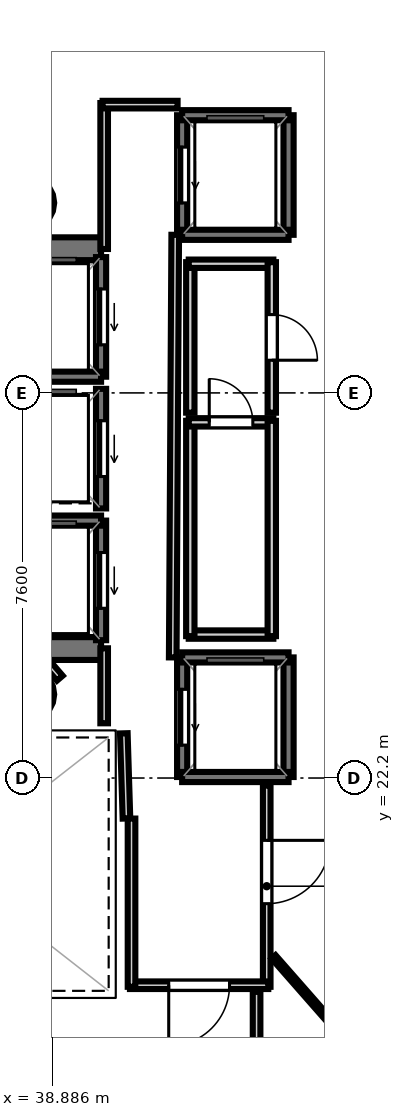
"""IFC4 building model, lengths in metres.
Left out: names, types, materials, properties, quantities, classifications, styles, units other than length and angle.
Written with IfcOpenShell. Run it as: python <this file> out.ifc"""

import sys

from ifc_helpers import new_model, si_unit, direction, frame, frame_2d, origin, origin_2d, place, context, subcontext, project, spatial, rectangle, hollow_circle, extrude, element, fill, save


model = new_model("IFC4")
c1 = context("Model", 3, precision=1e-05, world=origin(), true_north=direction((0.0, 1.0)))
c2 = subcontext(c1, "Body", "Model", "MODEL_VIEW")
j1 = project(units=[si_unit("LENGTHUNIT", "METRE"), si_unit("PLANEANGLEUNIT", "RADIAN")], contexts=[c1])
p1 = place(None, origin())
s1 = spatial("IfcSite", under=j1, at=p1, CompositionType="ELEMENT")
p2 = place(p1, origin())
s2 = spatial("IfcBuilding", under=s1, at=p2, CompositionType="ELEMENT")
p3 = place(p2, frame((0.0, 0.0, 261.2)))
s3 = spatial("IfcBuildingStorey", under=s2, at=p3, CompositionType="ELEMENT", Elevation=261.2)
p4 = place(p3, frame((29.33, 32.645, 0.0), z_axis=(0.0, 0.0, 1.0), x_axis=(1.0, 0.0, 0.0)))
e1 = element("IfcWall", 1, at=p4, inside=s3, PredefinedType="SHEAR", context=c2, shape_type="SweptSolid", body=[
    extrude(rectangle(XDim=10.52, YDim=0.45, at=frame_2d((5.26, 0.0))), origin(), (0.0, 0.0, 1.0), 3.52),
])
p5 = place(p4, frame((0.895, 0.0, 0.0)))
e2 = element("IfcOpeningElement", 2, at=p5, cuts=e1, PredefinedType="OPENING", context=c2, shape_type="SweptSolid", body=[
    extrude(rectangle(XDim=1.25, YDim=2.15, at=frame_2d((0.625, 1.075))), frame((0.0, 0.235, 0.0), z_axis=(0.0, -1.0, 0.0), x_axis=(1.0, 0.0, 0.0)), (0.0, 0.0, 1.0), 0.47),
])
p6 = place(p3, frame((29.33, 24.755, 0.0), z_axis=(0.0, 0.0, 1.0), x_axis=(1.0, 0.0, 0.0)))
e3 = element("IfcWall", 3, at=p6, inside=s3, PredefinedType="SHEAR", context=c2, shape_type="SweptSolid", body=[
    extrude(rectangle(XDim=10.52, YDim=0.45, at=frame_2d((5.26, 0.0))), origin(), (0.0, 0.0, 1.0), 3.52),
])
p7 = place(p6, frame((0.695, 0.0, 0.0)))
e4 = element("IfcOpeningElement", 4, at=p7, cuts=e3, PredefinedType="OPENING", context=c2, shape_type="SweptSolid", body=[
    extrude(rectangle(XDim=1.25, YDim=2.15, at=frame_2d((0.625, 1.075))), frame((0.0, 0.235, 0.0), z_axis=(0.0, -1.0, 0.0), x_axis=(1.0, 0.0, 0.0)), (0.0, 0.0, 1.0), 0.47),
])
for number, where, z_axis, x_axis in (
    (5, (38.4, 33.55, 0.0), (0.0, 0.0, 1.0), (1.0, 0.0, 0.0)),
    (6, (38.4, 23.85, 0.0), (0.0, 0.0, 1.0), (1.0, 0.0, 0.0)),
):
    element("IfcColumn", number, at=place(p3, frame(where, z_axis=z_axis, x_axis=x_axis)), inside=s3, PredefinedType="COLUMN", context=c2, shape_type="SweptSolid", body=[
        extrude(hollow_circle(Radius=0.525, WallThickness=0.028, at=origin_2d()), origin(), (0.0, 0.0, 1.0), 3.7),
    ])
p8 = place(p3, frame((39.85, 30.12, 0.0), z_axis=(0.0, 0.0, 1.0), x_axis=(0.0, 1.0, 0.0)))
e7 = element("IfcWall", 7, at=p8, inside=s3, PredefinedType="SOLIDWALL", context=c2, shape_type="SweptSolid", body=[
    extrude(rectangle(XDim=2.36, YDim=0.2, at=frame_2d((1.18, 0.0))), origin(), (0.0, 0.0, 1.0), 3.52),
])
p9 = place(p8, frame((0.63, 0.0, 0.0)))
e8 = element("IfcOpeningElement", 8, at=p9, cuts=e7, PredefinedType="OPENING", context=c2, shape_type="SweptSolid", body=[
    extrude(rectangle(XDim=1.1, YDim=2.15, at=frame_2d((0.55, 1.075))), frame((0.0, 0.11, 0.0), z_axis=(0.0, -1.0, 0.0), x_axis=(1.0, 0.0, 0.0)), (0.0, 0.0, 1.0), 0.22),
])
p10 = place(p3, frame((37.75, 30.12, 0.0), z_axis=(0.0, 0.0, 1.0), x_axis=(1.0, 0.0, 0.0)))
e9 = element("IfcWall", 9, at=p10, inside=s3, PredefinedType="SOLIDWALL", context=c2, shape_type="SweptSolid", body=[
    extrude(rectangle(XDim=2.1, YDim=0.2, at=frame_2d((1.05, 0.0))), origin(), (0.0, 0.0, 1.0), 3.52),
])
p11 = place(p3, frame((39.85, 24.92, 0.0), z_axis=(0.0, 0.0, 1.0), x_axis=(0.0, 1.0, 0.0)))
e10 = element("IfcWall", 10, at=p11, inside=s3, PredefinedType="SOLIDWALL", context=c2, shape_type="SweptSolid", body=[
    extrude(rectangle(XDim=2.36, YDim=0.2, at=frame_2d((1.18, 0.0))), origin(), (0.0, 0.0, 1.0), 3.52),
])
p12 = place(p11, frame((0.63, 0.0, 0.0)))
e11 = element("IfcOpeningElement", 11, at=p12, cuts=e10, PredefinedType="OPENING", context=c2, shape_type="SweptSolid", body=[
    extrude(rectangle(XDim=1.1, YDim=2.15, at=frame_2d((0.55, 1.075))), frame((0.0, 0.11, 0.0), z_axis=(0.0, -1.0, 0.0), x_axis=(1.0, 0.0, 0.0)), (0.0, 0.0, 1.0), 0.22),
])
p13 = place(p3, frame((37.75, 27.28, 0.0), z_axis=(0.0, 0.0, 1.0), x_axis=(1.0, 0.0, 0.0)))
e12 = element("IfcWall", 12, at=p13, inside=s3, PredefinedType="SOLIDWALL", context=c2, shape_type="SweptSolid", body=[
    extrude(rectangle(XDim=2.1, YDim=0.2, at=frame_2d((1.05, 0.0))), origin(), (0.0, 0.0, 1.0), 3.52),
])
p14 = place(p3, frame((39.85, 27.52, 0.0), z_axis=(0.0, 0.0, 1.0), x_axis=(0.0, 1.0, 0.0)))
e13 = element("IfcWall", 13, at=p14, inside=s3, PredefinedType="SOLIDWALL", context=c2, shape_type="SweptSolid", body=[
    extrude(rectangle(XDim=2.36, YDim=0.2, at=frame_2d((1.18, 0.0))), origin(), (0.0, 0.0, 1.0), 3.52),
])
p15 = place(p14, frame((0.63, 0.0, 0.0)))
e14 = element("IfcOpeningElement", 14, at=p15, cuts=e13, PredefinedType="OPENING", context=c2, shape_type="SweptSolid", body=[
    extrude(rectangle(XDim=1.1, YDim=2.15, at=frame_2d((0.55, 1.075))), frame((0.0, 0.11, 0.0), z_axis=(0.0, -1.0, 0.0), x_axis=(1.0, 0.0, 0.0)), (0.0, 0.0, 1.0), 0.22),
])
p16 = place(p3, frame((43.55, 22.22, 0.0), z_axis=(0.0, 0.0, 1.0), x_axis=(0.0, 1.0, 0.0)))
e15 = element("IfcWall", 15, at=p16, inside=s3, PredefinedType="SOLIDWALL", context=c2, shape_type="SweptSolid", body=[
    extrude(rectangle(XDim=2.36, YDim=0.2, at=frame_2d((1.18, 0.0))), origin(), (0.0, 0.0, 1.0), 3.52),
])
p17 = place(p3, frame((41.45, 22.22, 0.0), z_axis=(0.0, 0.0, 1.0), x_axis=(0.0, 1.0, 0.0)))
e16 = element("IfcWall", 16, at=p17, inside=s3, PredefinedType="SOLIDWALL", context=c2, shape_type="SweptSolid", body=[
    extrude(rectangle(XDim=2.36, YDim=0.2, at=frame_2d((1.18, 0.0))), origin(), (0.0, 0.0, 1.0), 3.52),
])
p18 = place(p17, frame((0.63, 0.0, 0.0)))
e17 = element("IfcOpeningElement", 17, at=p18, cuts=e16, PredefinedType="OPENING", context=c2, shape_type="SweptSolid", body=[
    extrude(rectangle(XDim=1.1, YDim=2.15, at=frame_2d((0.55, 1.075))), frame((0.0, 0.11, 0.0), z_axis=(0.0, -1.0, 0.0), x_axis=(1.0, 0.0, 0.0)), (0.0, 0.0, 1.0), 0.22),
])
for number, where, z_axis, x_axis in (
    (18, (41.45, 24.58, 0.0), (0.0, 0.0, 1.0), (1.0, 0.0, 0.0)),
    (19, (41.45, 22.22, 0.0), (0.0, 0.0, 1.0), (1.0, 0.0, 0.0)),
):
    element("IfcWall", number, at=place(p3, frame(where, z_axis=z_axis, x_axis=x_axis)), inside=s3, PredefinedType="SOLIDWALL", context=c2, shape_type="SweptSolid", body=[
        extrude(rectangle(XDim=2.1, YDim=0.2, at=frame_2d((1.05, 0.0))), origin(), (0.0, 0.0, 1.0), 3.52),
    ])
p19 = place(p3, frame((43.55, 32.92, 0.0), z_axis=(0.0, 0.0, 1.0), x_axis=(0.0, 1.0, 0.0)))
e20 = element("IfcWall", 20, at=p19, inside=s3, PredefinedType="SOLIDWALL", context=c2, shape_type="SweptSolid", body=[
    extrude(rectangle(XDim=2.36, YDim=0.2, at=frame_2d((1.18, 0.0))), origin(), (0.0, 0.0, 1.0), 3.52),
])
p20 = place(p3, frame((41.45, 32.92, 0.0), z_axis=(0.0, 0.0, 1.0), x_axis=(0.0, 1.0, 0.0)))
e21 = element("IfcWall", 21, at=p20, inside=s3, PredefinedType="SOLIDWALL", context=c2, shape_type="SweptSolid", body=[
    extrude(rectangle(XDim=2.36, YDim=0.2, at=frame_2d((1.18, 0.0))), origin(), (0.0, 0.0, 1.0), 3.52),
])
p21 = place(p20, frame((0.63, 0.0, 0.0)))
e22 = element("IfcOpeningElement", 22, at=p21, cuts=e21, PredefinedType="OPENING", context=c2, shape_type="SweptSolid", body=[
    extrude(rectangle(XDim=1.1, YDim=2.15, at=frame_2d((0.55, 1.075))), frame((0.0, 0.11, 0.0), z_axis=(0.0, -1.0, 0.0), x_axis=(1.0, 0.0, 0.0)), (0.0, 0.0, 1.0), 0.22),
])
for number, where, z_axis, x_axis in (
    (23, (41.45, 35.28, 0.0), (0.0, 0.0, 1.0), (1.0, 0.0, 0.0)),
    (24, (41.45, 32.92, 0.0), (0.0, 0.0, 1.0), (1.0, 0.0, 0.0)),
):
    element("IfcWall", number, at=place(p3, frame(where, z_axis=z_axis, x_axis=x_axis)), inside=s3, PredefinedType="SOLIDWALL", context=c2, shape_type="SweptSolid", body=[
        extrude(rectangle(XDim=2.1, YDim=0.2, at=frame_2d((1.05, 0.0))), origin(), (0.0, 0.0, 1.0), 3.52),
    ])
p22 = place(p3, frame((40.351, 21.401, 0.0), z_axis=(0.0, 0.0, 1.0), x_axis=(-0.031058045979, 0.999517582527, 0.0)))
e25 = element("IfcWall", 25, at=p22, inside=s3, PredefinedType="PARTITIONING", context=c2, shape_type="SweptSolid", body=[
    extrude(rectangle(XDim=1.682, YDim=0.15, at=frame_2d((0.841, 0.0))), origin(), (0.0, 0.0, 1.0), 2.84),
])
p23 = place(p3, frame((39.911, 23.28, 0.0), z_axis=(0.0, 0.0, 1.0), x_axis=(0.0, 1.0, 0.0)))
e26 = element("IfcWall", 26, at=p23, inside=s3, PredefinedType="PARTITIONING", context=c2, shape_type="SweptSolid", body=[
    extrude(rectangle(XDim=1.48, YDim=0.15, at=frame_2d((0.74, 0.0))), origin(), (0.0, 0.0, 1.0), 2.84),
])
p24 = place(p3, frame((39.911, 32.64, 0.0), z_axis=(0.0, 0.0, 1.0), x_axis=(0.0, 1.0, 0.0)))
e27 = element("IfcWall", 27, at=p24, inside=s3, PredefinedType="PARTITIONING", context=c2, shape_type="SweptSolid", body=[
    extrude(rectangle(XDim=2.88, YDim=0.15, at=frame_2d((1.44, 0.0))), origin(), (0.0, 0.0, 1.0), 2.84),
])
p25 = place(p3, frame((39.88, 35.489, 0.0), z_axis=(0.0, 0.0, 1.0), x_axis=(1.0, 0.0, 0.0)))
e28 = element("IfcWall", 28, at=p25, inside=s3, PredefinedType="PARTITIONING", context=c2, shape_type="SweptSolid", body=[
    extrude(rectangle(XDim=1.48, YDim=0.15, at=frame_2d((0.74, 0.0))), origin(), (0.0, 0.0, 1.0), 2.84),
])
p26 = place(p3, frame((41.313, 32.92, 0.0), z_axis=(0.0, 0.0, 1.0), x_axis=(-0.005942518022, -0.999982343084, 0.0)))
e29 = element("IfcWall", 29, at=p26, inside=s3, PredefinedType="PARTITIONING", context=c2, shape_type="SweptSolid", body=[
    extrude(rectangle(XDim=8.34, YDim=0.15, at=frame_2d((4.17, 0.0))), origin(), (0.0, 0.0, 1.0), 2.84),
])
p27 = place(p3, frame((43.119, 22.05, 0.0), z_axis=(0.0, 0.0, 1.0), x_axis=(0.0, -1.0, 0.0)))
e30 = element("IfcWall", 30, at=p27, inside=s3, PredefinedType="PARTITIONING", context=c2, shape_type="SweptSolid", body=[
    extrude(rectangle(XDim=3.97, YDim=0.15, at=frame_2d((1.985, 0.0))), origin(), (0.0, 0.0, 1.0), 2.84),
])
p28 = place(p27, frame((1.08, 0.0, 0.0)))
e31 = element("IfcOpeningElement", 31, at=p28, cuts=e30, PredefinedType="OPENING", context=c2, shape_type="SweptSolid", body=[
    extrude(rectangle(XDim=1.25, YDim=2.2, at=frame_2d((0.625, 1.1))), frame((0.0, 0.085, 0.0), z_axis=(0.0, -1.0, 0.0), x_axis=(1.0, 0.0, 0.0)), (0.0, 0.0, 1.0), 0.17),
])
p29 = place(p3, frame((43.15, 18.111, 0.0), z_axis=(0.0, 0.0, 1.0), x_axis=(-1.0, 0.0, 0.0)))
e32 = element("IfcWall", 32, at=p29, inside=s3, PredefinedType="PARTITIONING", context=c2, shape_type="SweptSolid", body=[
    extrude(rectangle(XDim=2.73, YDim=0.15, at=frame_2d((1.365, 0.0))), origin(), (0.0, 0.0, 1.0), 2.84),
])
p30 = place(p29, frame((0.765, 0.0, 0.0)))
e33 = element("IfcOpeningElement", 33, at=p30, cuts=e32, PredefinedType="OPENING", context=c2, shape_type="SweptSolid", body=[
    extrude(rectangle(XDim=1.2, YDim=2.15, at=frame_2d((0.6, 1.075))), frame((0.0, 0.085, 0.0), z_axis=(0.0, -1.0, 0.0), x_axis=(1.0, 0.0, 0.0)), (0.0, 0.0, 1.0), 0.17),
])
p31 = place(p3, frame((40.451, 18.08, 0.0), z_axis=(0.0, 0.0, 1.0), x_axis=(0.0, 1.0, 0.0)))
e34 = element("IfcWall", 34, at=p31, inside=s3, PredefinedType="PARTITIONING", context=c2, shape_type="SweptSolid", body=[
    extrude(rectangle(XDim=3.32, YDim=0.15, at=frame_2d((1.66, 0.0))), origin(), (0.0, 0.0, 1.0), 2.84),
])
p32 = place(p3, frame((43.25, 25.031, 0.0), z_axis=(0.0, 0.0, 1.0), x_axis=(-1.0, 0.0, 0.0)))
e35 = element("IfcWall", 35, at=p32, inside=s3, PredefinedType="PLUMBINGWALL", context=c2, shape_type="SweptSolid", body=[
    extrude(rectangle(XDim=1.67, YDim=0.165, at=frame_2d((0.835, 0.0))), origin(), (0.0, 0.0, 1.0), 2.84),
])
p33 = place(p3, frame((41.611, 25.0, 0.0), z_axis=(0.0, 0.0, 1.0), x_axis=(0.0, 1.0, 0.0)))
e36 = element("IfcWall", 36, at=p33, inside=s3, PredefinedType="PLUMBINGWALL", context=c2, shape_type="SweptSolid", body=[
    extrude(rectangle(XDim=4.25, YDim=0.165, at=frame_2d((2.125, 0.0))), origin(), (0.0, 0.0, 1.0), 2.84),
])
p34 = place(p3, frame((41.58, 29.219, 0.0), z_axis=(0.0, 0.0, 1.0), x_axis=(1.0, 0.0, 0.0)))
e37 = element("IfcWall", 37, at=p34, inside=s3, PredefinedType="PLUMBINGWALL", context=c2, shape_type="SweptSolid", body=[
    extrude(rectangle(XDim=1.67, YDim=0.165, at=frame_2d((0.835, 0.0))), origin(), (0.0, 0.0, 1.0), 2.84),
])
p35 = place(p34, frame((0.405, 0.0, 0.0)))
e38 = element("IfcOpeningElement", 38, at=p35, cuts=e37, PredefinedType="OPENING", context=c2, shape_type="SweptSolid", body=[
    extrude(rectangle(XDim=0.86, YDim=2.05, at=frame_2d((0.43, 1.025))), frame((0.0, 0.093, 0.0), z_axis=(0.0, -1.0, 0.0), x_axis=(1.0, 0.0, 0.0)), (0.0, 0.0, 1.0), 0.185),
])
p36 = place(p3, frame((43.219, 29.25, 0.0), z_axis=(0.0, 0.0, 1.0), x_axis=(0.0, -1.0, 0.0)))
e39 = element("IfcWall", 39, at=p36, inside=s3, PredefinedType="PLUMBINGWALL", context=c2, shape_type="SweptSolid", body=[
    extrude(rectangle(XDim=4.25, YDim=0.165, at=frame_2d((2.125, 0.0))), origin(), (0.0, 0.0, 1.0), 2.84),
])
p37 = place(p3, frame((41.611, 29.41, 0.0), z_axis=(0.0, 0.0, 1.0), x_axis=(0.0, 1.0, 0.0)))
e40 = element("IfcWall", 40, at=p37, inside=s3, PredefinedType="PLUMBINGWALL", context=c2, shape_type="SweptSolid", body=[
    extrude(rectangle(XDim=2.97, YDim=0.165, at=frame_2d((1.485, 0.0))), origin(), (0.0, 0.0, 1.0), 2.84),
])
p38 = place(p3, frame((41.58, 32.349, 0.0), z_axis=(0.0, 0.0, 1.0), x_axis=(1.0, 0.0, 0.0)))
e41 = element("IfcWall", 41, at=p38, inside=s3, PredefinedType="PLUMBINGWALL", context=c2, shape_type="SweptSolid", body=[
    extrude(rectangle(XDim=1.67, YDim=0.165, at=frame_2d((0.835, 0.0))), origin(), (0.0, 0.0, 1.0), 2.84),
])
p39 = place(p3, frame((43.219, 32.38, 0.0), z_axis=(0.0, 0.0, 1.0), x_axis=(0.0, -1.0, 0.0)))
e42 = element("IfcWall", 42, at=p39, inside=s3, PredefinedType="PLUMBINGWALL", context=c2, shape_type="SweptSolid", body=[
    extrude(rectangle(XDim=2.97, YDim=0.165, at=frame_2d((1.485, 0.0))), origin(), (0.0, 0.0, 1.0), 2.84),
])
p40 = place(p39, frame((1.035, 0.0, 0.0)))
e43 = element("IfcOpeningElement", 43, at=p40, cuts=e42, PredefinedType="OPENING", context=c2, shape_type="SweptSolid", body=[
    extrude(rectangle(XDim=0.9, YDim=2.1, at=frame_2d((0.45, 1.05))), frame((0.0, 0.093, 0.0), z_axis=(0.0, -1.0, 0.0), x_axis=(1.0, 0.0, 0.0)), (0.0, 0.0, 1.0), 0.185),
])
p41 = place(p3, frame((39.036, 24.17, 0.0), z_axis=(0.0, 0.0, 1.0), x_axis=(-0.652260263346, 0.757995084984, 0.0)))
e44 = element("IfcWall", 44, at=p41, inside=s3, PredefinedType="PARTITIONING", context=c2, shape_type="SweptSolid", body=[
    extrude(rectangle(XDim=0.355, YDim=0.15, at=frame_2d((0.178, 0.0))), origin(), (0.0, 0.0, 1.0), 2.84),
])
p42 = place(p3, frame((42.919, 17.98, 0.0), z_axis=(0.0, 0.0, 1.0), x_axis=(0.0, -1.0, 0.0)))
e45 = element("IfcWall", 45, at=p42, inside=s3, PredefinedType="PARTITIONING", context=c2, shape_type="SweptSolid", body=[
    extrude(rectangle(XDim=3.032, YDim=0.15, at=frame_2d((1.516, 0.0))), origin(), (0.0, 0.0, 1.0), 2.84),
])
p43 = place(p3, frame((21.45, 35.942, 0.0), z_axis=(0.0, 0.0, 1.0), x_axis=(0.999146821051, 0.041299273399, 0.0)))
e46 = element("IfcWall", 46, at=p43, inside=s3, PredefinedType="PARTITIONING", context=c2, shape_type="SweptSolid", body=[
    extrude(rectangle(XDim=34.854, YDim=0.105, at=frame_2d((17.427, 0.0))), origin(), (0.0, 0.0, 1.0), 2.84),
])
p44 = place(p3, frame((44.65, 17.08, 0.0), z_axis=(0.0, 0.0, 1.0), x_axis=(-0.659728126863, 0.751504357024, 0.0)))
e47 = element("IfcWall", 47, at=p44, inside=s3, PredefinedType="PARTITIONING", context=c2, shape_type="SweptSolid", body=[
    extrude(rectangle(XDim=2.117, YDim=0.105, at=frame_2d((1.059, 0.0))), origin(), (0.0, 0.0, 1.0), 2.84),
])
p45 = place(p9, origin())
e48 = element("IfcDoor", 48, at=p45, inside=s3, OperationType="SLIDING_TO_LEFT", PredefinedType="DOOR", context=c2, shape_type="SweptSolid", body=[
    extrude(rectangle(XDim=1.1, YDim=2.15, at=frame_2d((0.55, 1.075))), frame((0.0, 0.025, 0.0), z_axis=(0.0, -1.0, 0.0), x_axis=(1.0, 0.0, 0.0)), (0.0, 0.0, 1.0), 0.05),
])
fill(e8, e48)
p46 = place(p12, origin())
e49 = element("IfcDoor", 49, at=p46, inside=s3, OperationType="SLIDING_TO_LEFT", PredefinedType="DOOR", context=c2, shape_type="SweptSolid", body=[
    extrude(rectangle(XDim=1.1, YDim=2.15, at=frame_2d((0.55, 1.075))), frame((0.0, 0.025, 0.0), z_axis=(0.0, -1.0, 0.0), x_axis=(1.0, 0.0, 0.0)), (0.0, 0.0, 1.0), 0.05),
])
fill(e11, e49)
p47 = place(p15, origin())
e50 = element("IfcDoor", 50, at=p47, inside=s3, OperationType="SLIDING_TO_LEFT", PredefinedType="DOOR", context=c2, shape_type="SweptSolid", body=[
    extrude(rectangle(XDim=1.1, YDim=2.15, at=frame_2d((0.55, 1.075))), frame((0.0, 0.025, 0.0), z_axis=(0.0, -1.0, 0.0), x_axis=(1.0, 0.0, 0.0)), (0.0, 0.0, 1.0), 0.05),
])
fill(e14, e50)
p48 = place(p18, origin())
e51 = element("IfcDoor", 51, at=p48, inside=s3, OperationType="SLIDING_TO_LEFT", PredefinedType="DOOR", context=c2, shape_type="SweptSolid", body=[
    extrude(rectangle(XDim=1.1, YDim=2.15, at=frame_2d((0.55, 1.075))), frame((0.0, 0.025, 0.0), z_axis=(0.0, -1.0, 0.0), x_axis=(1.0, 0.0, 0.0)), (0.0, 0.0, 1.0), 0.05),
])
fill(e17, e51)
p49 = place(p21, origin())
e52 = element("IfcDoor", 52, at=p49, inside=s3, OperationType="SLIDING_TO_LEFT", PredefinedType="DOOR", context=c2, shape_type="SweptSolid", body=[
    extrude(rectangle(XDim=1.1, YDim=2.15, at=frame_2d((0.55, 1.075))), frame((0.0, 0.025, 0.0), z_axis=(0.0, -1.0, 0.0), x_axis=(1.0, 0.0, 0.0)), (0.0, 0.0, 1.0), 0.05),
])
fill(e22, e52)
p50 = place(p30, origin())
e53 = element("IfcDoor", 53, at=p50, inside=s3, OperationType="SINGLE_SWING_RIGHT", PredefinedType="DOOR", context=c2, shape_type="SweptSolid", body=[
    extrude(rectangle(XDim=1.2, YDim=2.15, at=frame_2d((0.6, 1.075))), frame((0.0, 0.025, 0.0), z_axis=(0.0, -1.0, 0.0), x_axis=(1.0, 0.0, 0.0)), (0.0, 0.0, 1.0), 0.05),
])
fill(e33, e53)
p51 = place(p28, origin())
e54 = element("IfcDoor", 54, at=p51, inside=s3, OperationType="SINGLE_SWING_LEFT", PredefinedType="DOOR", context=c2, shape_type="SweptSolid", body=[
    extrude(rectangle(XDim=1.25, YDim=2.2, at=frame_2d((0.625, 1.1))), frame((0.0, 0.025, 0.0), z_axis=(0.0, -1.0, 0.0), x_axis=(1.0, 0.0, 0.0)), (0.0, 0.0, 1.0), 0.05),
])
fill(e31, e54)
p52 = place(p40, origin())
e55 = element("IfcDoor", 55, at=p52, inside=s3, OperationType="SINGLE_SWING_RIGHT", PredefinedType="DOOR", context=c2, shape_type="SweptSolid", body=[
    extrude(rectangle(XDim=0.9, YDim=2.1, at=frame_2d((0.45, 1.05))), frame((0.0, 0.025, 0.0), z_axis=(0.0, -1.0, 0.0), x_axis=(1.0, 0.0, 0.0)), (0.0, 0.0, 1.0), 0.05),
])
fill(e43, e55)
p53 = place(p35, origin())
e56 = element("IfcDoor", 56, at=p53, inside=s3, OperationType="SINGLE_SWING_LEFT", PredefinedType="DOOR", context=c2, shape_type="SweptSolid", body=[
    extrude(rectangle(XDim=0.86, YDim=2.05, at=frame_2d((0.43, 1.025))), frame((0.0, 0.025, 0.0), z_axis=(0.0, -1.0, 0.0), x_axis=(1.0, 0.0, 0.0)), (0.0, 0.0, 1.0), 0.05),
])
fill(e38, e56)
save(model, sys.argv[1])
